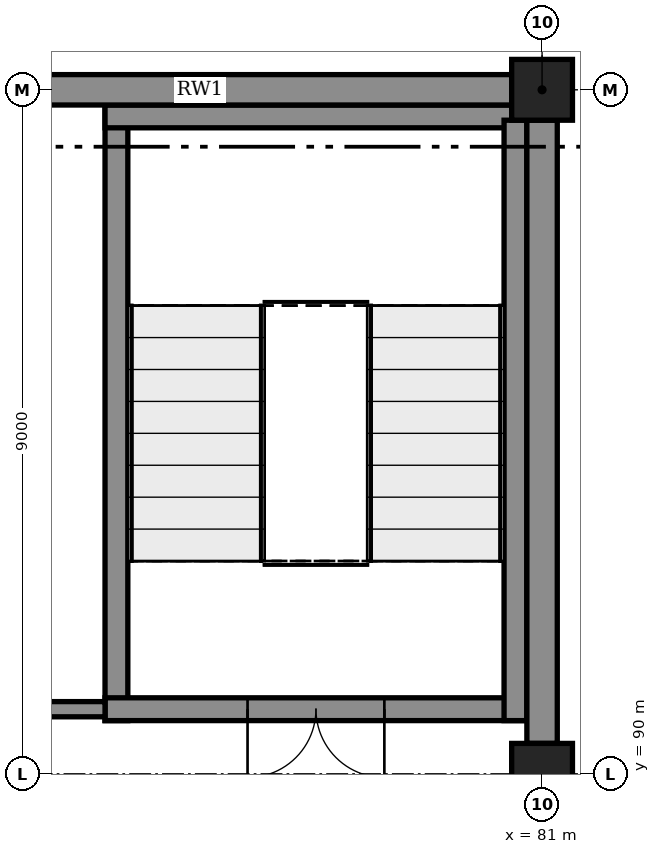
"""IFC4 building model, lengths in metres.
Left out: names, types, materials, properties, quantities, classifications, styles, units other than length and angle.
Written with IfcOpenShell. Run it as: python <this file> out.ifc"""

import sys

from ifc_helpers import new_model, si_unit, direction, frame, frame_2d, origin, origin_2d, place, context, subcontext, project, spatial, rectangle, extrude, element, fill, save


model = new_model("IFC4")
c1 = context("Model", 3, precision=1e-05, world=origin(), true_north=direction((0.0, 1.0)))
c2 = subcontext(c1, "Body", "Model", "MODEL_VIEW")
j1 = project(units=[si_unit("LENGTHUNIT", "METRE"), si_unit("PLANEANGLEUNIT", "RADIAN")], contexts=[c1])
p1 = place(None, origin())
s1 = spatial("IfcSite", under=j1, at=p1, CompositionType="ELEMENT")
p2 = place(p1, origin())
s2 = spatial("IfcBuilding", under=s1, at=p2, CompositionType="ELEMENT")
p3 = place(p2, frame((0.0, 0.0, 6.0)))
s3 = spatial("IfcBuildingStorey", under=s2, at=p3, CompositionType="ELEMENT", Elevation=6.0)
for number, where, z_axis, x_axis in (
    (1, (81.0, 90.0, 0.0), (0.0, 0.0, 1.0), (1.0, 0.0, 0.0)),
    (2, (81.0, 99.0, 0.0), (0.0, 0.0, 1.0), (1.0, 0.0, 0.0)),
):
    element("IfcColumn", number, at=place(p3, frame(where, z_axis=z_axis, x_axis=x_axis)), inside=s3, PredefinedType="COLUMN", context=c2, shape_type="SweptSolid", body=[
        extrude(rectangle(XDim=0.8, YDim=0.8, at=origin_2d()), origin(), (0.0, 0.0, 1.0), 5.5),
    ])
for number, where, z_axis, x_axis in (
    (3, (72.4, 99.0, 0.0), (0.0, 0.0, 1.0), (1.0, 0.0, 0.0)),
    (4, (81.0, 90.4, 0.0), (0.0, 0.0, 1.0), (0.0, 1.0, 0.0)),
):
    element("IfcWall", number, at=place(p3, frame(where, z_axis=z_axis, x_axis=x_axis)), inside=s3, PredefinedType="SOLIDWALL", context=c2, shape_type="SweptSolid", body=[
        extrude(rectangle(XDim=8.2, YDim=0.4, at=frame_2d((4.1, 0.0))), origin(), (0.0, 0.0, 1.0), 4.32),
    ])
p4 = place(p3, frame((80.6, 98.65, 0.0), z_axis=(0.0, 0.0, 1.0), x_axis=(-1.0, 0.0, 0.0)))
e5 = element("IfcWall", 5, at=p4, inside=s3, PredefinedType="SOLIDWALL", context=c2, shape_type="SweptSolid", body=[
    extrude(rectangle(XDim=5.35, YDim=0.3, at=frame_2d((2.675, 0.0))), origin(), (0.0, 0.0, 1.0), 5.22),
])
p5 = place(p3, frame((80.8, 90.85, 0.0), z_axis=(0.0, 0.0, 1.0), x_axis=(-1.0, 0.0, 0.0)))
e6 = element("IfcWall", 6, at=p5, inside=s3, PredefinedType="SOLIDWALL", context=c2, shape_type="SweptSolid", body=[
    extrude(rectangle(XDim=5.55, YDim=0.3, at=frame_2d((2.775, 0.0))), origin(), (0.0, 0.0, 1.0), 5.22),
])
p6 = place(p5, frame((1.875, 0.0, 0.0)))
e7 = element("IfcOpeningElement", 7, at=p6, cuts=e6, PredefinedType="OPENING", context=c2, shape_type="SweptSolid", body=[
    extrude(rectangle(XDim=1.8, YDim=2.4, at=frame_2d((0.9, 1.2))), frame((0.0, 0.16, 0.0), z_axis=(0.0, -1.0, 0.0), x_axis=(1.0, 0.0, 0.0)), (0.0, 0.0, 1.0), 0.32),
])
p7 = place(p3, frame((80.65, 98.6, 0.0), z_axis=(0.0, 0.0, 1.0), x_axis=(0.0, -1.0, 0.0)))
e8 = element("IfcWall", 8, at=p7, inside=s3, PredefinedType="SOLIDWALL", context=c2, shape_type="SweptSolid", body=[
    extrude(rectangle(XDim=7.9, YDim=0.3, at=frame_2d((3.95, 0.0))), origin(), (0.0, 0.0, 1.0), 5.22),
])
p8 = place(p3, frame((75.4, 98.8, 0.0), z_axis=(0.0, 0.0, 1.0), x_axis=(0.0, -1.0, 0.0)))
e9 = element("IfcWall", 9, at=p8, inside=s3, PredefinedType="SOLIDWALL", context=c2, shape_type="SweptSolid", body=[
    extrude(rectangle(XDim=8.1, YDim=0.3, at=frame_2d((4.05, 0.0))), origin(), (0.0, 0.0, 1.0), 5.22),
])
p9 = place(p3, frame((75.25, 90.85, 0.0), z_axis=(0.0, 0.0, 1.0), x_axis=(-1.0, 0.0, 0.0)))
e10 = element("IfcWall", 10, at=p9, inside=s3, PredefinedType="PARTITIONING", context=c2, shape_type="SweptSolid", body=[
    extrude(rectangle(XDim=6.85, YDim=0.2, at=frame_2d((3.425, 0.0))), origin(), (0.0, 0.0, 1.0), 5.22),
])
p10 = place(p9, frame((1.15, 0.0, 0.0)))
e11 = element("IfcOpeningElement", 11, at=p10, cuts=e10, PredefinedType="OPENING", context=c2, shape_type="SweptSolid", body=[
    extrude(rectangle(XDim=0.9, YDim=2.1, at=frame_2d((0.45, 1.05))), frame((0.0, 0.11, 0.0), z_axis=(0.0, -1.0, 0.0), x_axis=(1.0, 0.0, 0.0)), (0.0, 0.0, 1.0), 0.22),
])
p11 = place(p6, origin())
e12 = element("IfcDoor", 12, at=p11, inside=s3, OperationType="DOUBLE_DOOR_SINGLE_SWING", PredefinedType="DOOR", context=c2, shape_type="SweptSolid", body=[
    extrude(rectangle(XDim=1.8, YDim=2.4, at=frame_2d((0.9, 1.2))), frame((0.0, 0.025, 0.0), z_axis=(0.0, -1.0, 0.0), x_axis=(1.0, 0.0, 0.0)), (0.0, 0.0, 1.0), 0.05),
])
fill(e7, e12)
save(model, sys.argv[1])
